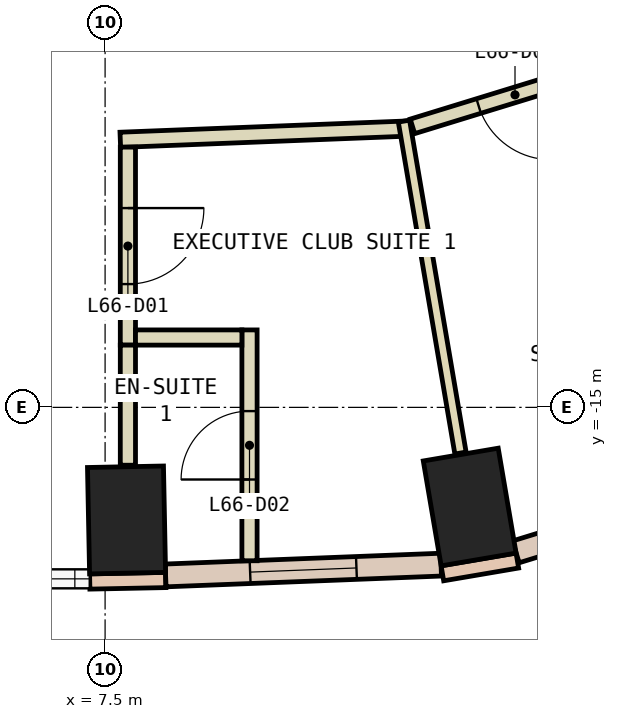
"""IFC4 building model, lengths in metres.
Left out: names, types, materials, properties, quantities, classifications, styles, units other than length and angle.
Written with IfcOpenShell. Run it as: python <this file> out.ifc"""

import sys

from ifc_helpers import new_model, si_unit, direction, frame, frame_2d, origin, origin_2d, place, context, subcontext, project, spatial, rectangle, extrude, element, fill, save


model = new_model("IFC4")
c1 = context("Model", 3, precision=1e-05, world=origin(), true_north=direction((0.0, 1.0)))
c2 = subcontext(c1, "Body", "Model", "MODEL_VIEW")
j1 = project(units=[si_unit("LENGTHUNIT", "METRE"), si_unit("PLANEANGLEUNIT", "RADIAN")], contexts=[c1])
p1 = place(None, origin())
s1 = spatial("IfcSite", under=j1, at=p1, CompositionType="ELEMENT")
p2 = place(p1, origin())
s2 = spatial("IfcBuilding", under=s1, at=p2, CompositionType="ELEMENT")
p3 = place(p2, frame((0.0, 0.0, 286.4)))
s3 = spatial("IfcBuildingStorey", under=s2, at=p3, CompositionType="ELEMENT", Elevation=286.4)
for number, where, z_axis, x_axis in (
    (1, (7.782, -16.481, 0.0), (0.0, 0.0, 1.0), (1.0, 0.02, 0.0)),
    (2, (12.297, -16.311, 0.0), (0.0, 0.0, 1.0), (0.986, 0.168, 0.0)),
):
    element("IfcColumn", number, at=place(p3, frame(where, z_axis=z_axis, x_axis=x_axis)), inside=s3, PredefinedType="COLUMN", context=c2, shape_type="SweptSolid", body=[
        extrude(rectangle(XDim=1.0, YDim=1.4, at=origin_2d()), origin(), (0.0, 0.0, 1.0), 3.26),
    ])
for number, where, z_axis, x_axis in (
    (3, (7.298, -17.291, 0.0), (0.0, 0.0, 1.0), (1.0, 0.02, 0.0)),
    (4, (11.938, -17.183, 0.0), (0.0, 0.0, 1.0), (0.986, 0.168, 0.0)),
):
    element("IfcWall", number, at=place(p3, frame(where, z_axis=z_axis, x_axis=x_axis)), inside=s3, PredefinedType="STANDARD", context=c2, shape_type="SweptSolid", body=[
        extrude(rectangle(XDim=1.0, YDim=0.2, at=frame_2d((0.5, 0.0))), origin(), (0.0, 0.0, 1.0), 3.26),
    ])
p4 = place(p3, frame((8.296, -17.211, 0.0), z_axis=(0.0, 0.0, 1.0), x_axis=(0.999234893779, 0.039110446866, 0.0)))
e5 = element("IfcWall", 5, at=p4, inside=s3, PredefinedType="STANDARD", context=c2, shape_type="SweptSolid", body=[
    extrude(rectangle(XDim=3.627, YDim=0.3, at=frame_2d((1.813, 0.0))), origin(), (0.0, 0.0, 1.0), 3.26),
])
p5 = place(p4, frame((1.113, 0.0, 0.9)))
e6 = element("IfcOpeningElement", 6, at=p5, cuts=e5, PredefinedType="OPENING", context=c2, shape_type="SweptSolid", body=[
    extrude(rectangle(XDim=1.4, YDim=2.0, at=frame_2d((0.7, 1.0))), frame((0.0, 0.16, 0.0), z_axis=(0.0, -1.0, 0.0), x_axis=(1.0, 0.0, 0.0)), (0.0, 0.0, 1.0), 0.32),
])
p6 = place(p3, frame((12.904, -16.901, 0.0), z_axis=(0.0, 0.0, 1.0), x_axis=(0.955866957005, 0.293799864716, 0.0)))
e7 = element("IfcWall", 7, at=p6, inside=s3, PredefinedType="STANDARD", context=c2, shape_type="SweptSolid", body=[
    extrude(rectangle(XDim=4.02, YDim=0.3, at=frame_2d((2.01, 0.0))), origin(), (0.0, 0.0, 1.0), 3.26),
])
p7 = place(p6, frame((1.31, 0.0, 0.9)))
e8 = element("IfcOpeningElement", 8, at=p7, cuts=e7, PredefinedType="OPENING", context=c2, shape_type="SweptSolid", body=[
    extrude(rectangle(XDim=1.4, YDim=2.0, at=frame_2d((0.7, 1.0))), frame((0.0, 0.16, 0.0), z_axis=(0.0, -1.0, 0.0), x_axis=(1.0, 0.0, 0.0)), (0.0, 0.0, 1.0), 0.32),
])
p8 = place(p3, frame((11.474, -11.332, 0.0), z_axis=(0.0, 0.0, 1.0), x_axis=(-0.999232546126, -0.039170381199, 0.0)))
e9 = element("IfcWall", 9, at=p8, inside=s3, PredefinedType="PARTITIONING", context=c2, shape_type="SweptSolid", body=[
    extrude(rectangle(XDim=3.777, YDim=0.2, at=frame_2d((1.889, 0.0))), origin(), (0.0, 0.0, 1.0), 3.26),
])
p9 = place(p3, frame((14.243, -10.474, 0.0), z_axis=(0.0, 0.0, 1.0), x_axis=(-0.955937788993, -0.293569316475, 0.0)))
e10 = element("IfcWall", 10, at=p9, inside=s3, PredefinedType="PARTITIONING", context=c2, shape_type="SweptSolid", body=[
    extrude(rectangle(XDim=2.823, YDim=0.2, at=frame_2d((1.412, 0.0))), origin(), (0.0, 0.0, 1.0), 3.26),
])
p10 = place(p9, frame((0.912, 0.0, 0.0)))
e11 = element("IfcOpeningElement", 11, at=p10, cuts=e10, PredefinedType="OPENING", context=c2, shape_type="SweptSolid", body=[
    extrude(rectangle(XDim=1.0, YDim=2.1, at=frame_2d((0.5, 1.05))), frame((0.0, 0.11, 0.0), z_axis=(0.0, -1.0, 0.0), x_axis=(1.0, 0.0, 0.0)), (0.0, 0.0, 1.0), 0.22),
])
p11 = place(p3, frame((7.8, -11.576, 0.0), z_axis=(0.0, 0.0, 1.0), x_axis=(0.0, -1.0, 0.0)))
e12 = element("IfcWall", 12, at=p11, inside=s3, PredefinedType="PARTITIONING", context=c2, shape_type="SweptSolid", body=[
    extrude(rectangle(XDim=2.605, YDim=0.2, at=frame_2d((1.302, 0.0))), origin(), (0.0, 0.0, 1.0), 3.26),
])
p12 = place(p11, frame((0.802, 0.0, 0.0)))
e13 = element("IfcOpeningElement", 13, at=p12, cuts=e12, PredefinedType="OPENING", context=c2, shape_type="SweptSolid", body=[
    extrude(rectangle(XDim=1.0, YDim=2.1, at=frame_2d((0.5, 1.05))), frame((0.0, 0.11, 0.0), z_axis=(0.0, -1.0, 0.0), x_axis=(1.0, 0.0, 0.0)), (0.0, 0.0, 1.0), 0.22),
])
p13 = place(p3, frame((7.8, -14.181, 0.0), z_axis=(0.0, 0.0, 1.0), x_axis=(0.0, -1.0, 0.0)))
e14 = element("IfcWall", 14, at=p13, inside=s3, PredefinedType="PARTITIONING", context=c2, shape_type="SweptSolid", body=[
    extrude(rectangle(XDim=1.58, YDim=0.2, at=frame_2d((0.79, 0.0))), origin(), (0.0, 0.0, 1.0), 3.26),
])
p14 = place(p3, frame((9.4, -17.018, 0.0), z_axis=(0.0, 0.0, 1.0), x_axis=(0.0, 1.0, 0.0)))
e15 = element("IfcWall", 15, at=p14, inside=s3, PredefinedType="PARTITIONING", context=c2, shape_type="SweptSolid", body=[
    extrude(rectangle(XDim=3.037, YDim=0.2, at=frame_2d((1.519, 0.0))), origin(), (0.0, 0.0, 1.0), 3.26),
])
p15 = place(p14, frame((1.069, 0.0, 0.0)))
e16 = element("IfcOpeningElement", 16, at=p15, cuts=e15, PredefinedType="OPENING", context=c2, shape_type="SweptSolid", body=[
    extrude(rectangle(XDim=0.9, YDim=2.1, at=frame_2d((0.45, 1.05))), frame((0.0, 0.11, 0.0), z_axis=(0.0, -1.0, 0.0), x_axis=(1.0, 0.0, 0.0)), (0.0, 0.0, 1.0), 0.22),
])
p16 = place(p3, frame((9.3, -14.081, 0.0), z_axis=(0.0, 0.0, 1.0), x_axis=(-1.0, 0.0, 0.0)))
e17 = element("IfcWall", 17, at=p16, inside=s3, PredefinedType="PARTITIONING", context=c2, shape_type="SweptSolid", body=[
    extrude(rectangle(XDim=1.4, YDim=0.2, at=frame_2d((0.7, 0.0))), origin(), (0.0, 0.0, 1.0), 3.26),
])
p17 = place(p3, frame((11.432, -11.234, 0.0), z_axis=(0.0, 0.0, 1.0), x_axis=(0.16797255243, -0.98579167253, 0.0)))
e18 = element("IfcWall", 18, at=p17, inside=s3, PredefinedType="PARTITIONING", context=c2, shape_type="SweptSolid", body=[
    extrude(rectangle(XDim=4.43, YDim=0.15, at=frame_2d((2.215, 0.0))), origin(), (0.0, 0.0, 1.0), 3.26),
])
p18 = place(p5, origin())
e19 = element("IfcWindow", 19, at=p18, inside=s3, PartitioningType="SINGLE_PANEL", PredefinedType="WINDOW", context=c2, shape_type="SweptSolid", body=[
    extrude(rectangle(XDim=1.4, YDim=2.0, at=frame_2d((0.7, 1.0))), frame((0.0, 0.03, 0.0), z_axis=(0.0, -1.0, 0.0), x_axis=(1.0, 0.0, 0.0)), (0.0, 0.0, 1.0), 0.06),
])
fill(e6, e19)
p19 = place(p12, origin())
e20 = element("IfcDoor", 20, at=p19, inside=s3, OperationType="SINGLE_SWING_LEFT", PredefinedType="DOOR", context=c2, shape_type="SweptSolid", body=[
    extrude(rectangle(XDim=1.0, YDim=2.1, at=frame_2d((0.5, 1.05))), frame((0.0, 0.025, 0.0), z_axis=(0.0, -1.0, 0.0), x_axis=(1.0, 0.0, 0.0)), (0.0, 0.0, 1.0), 0.05),
])
fill(e13, e20)
p20 = place(p15, origin())
e21 = element("IfcDoor", 21, at=p20, inside=s3, OperationType="SINGLE_SWING_RIGHT", PredefinedType="DOOR", context=c2, shape_type="SweptSolid", body=[
    extrude(rectangle(XDim=0.9, YDim=2.1, at=frame_2d((0.45, 1.05))), frame((0.0, 0.025, 0.0), z_axis=(0.0, -1.0, 0.0), x_axis=(1.0, 0.0, 0.0)), (0.0, 0.0, 1.0), 0.05),
])
fill(e16, e21)
p21 = place(p10, origin())
e22 = element("IfcDoor", 22, at=p21, inside=s3, OperationType="SINGLE_SWING_LEFT", PredefinedType="DOOR", context=c2, shape_type="SweptSolid", body=[
    extrude(rectangle(XDim=1.0, YDim=2.1, at=frame_2d((0.5, 1.05))), frame((0.0, 0.025, 0.0), z_axis=(0.0, -1.0, 0.0), x_axis=(1.0, 0.0, 0.0)), (0.0, 0.0, 1.0), 0.05),
])
fill(e11, e22)
save(model, sys.argv[1])
